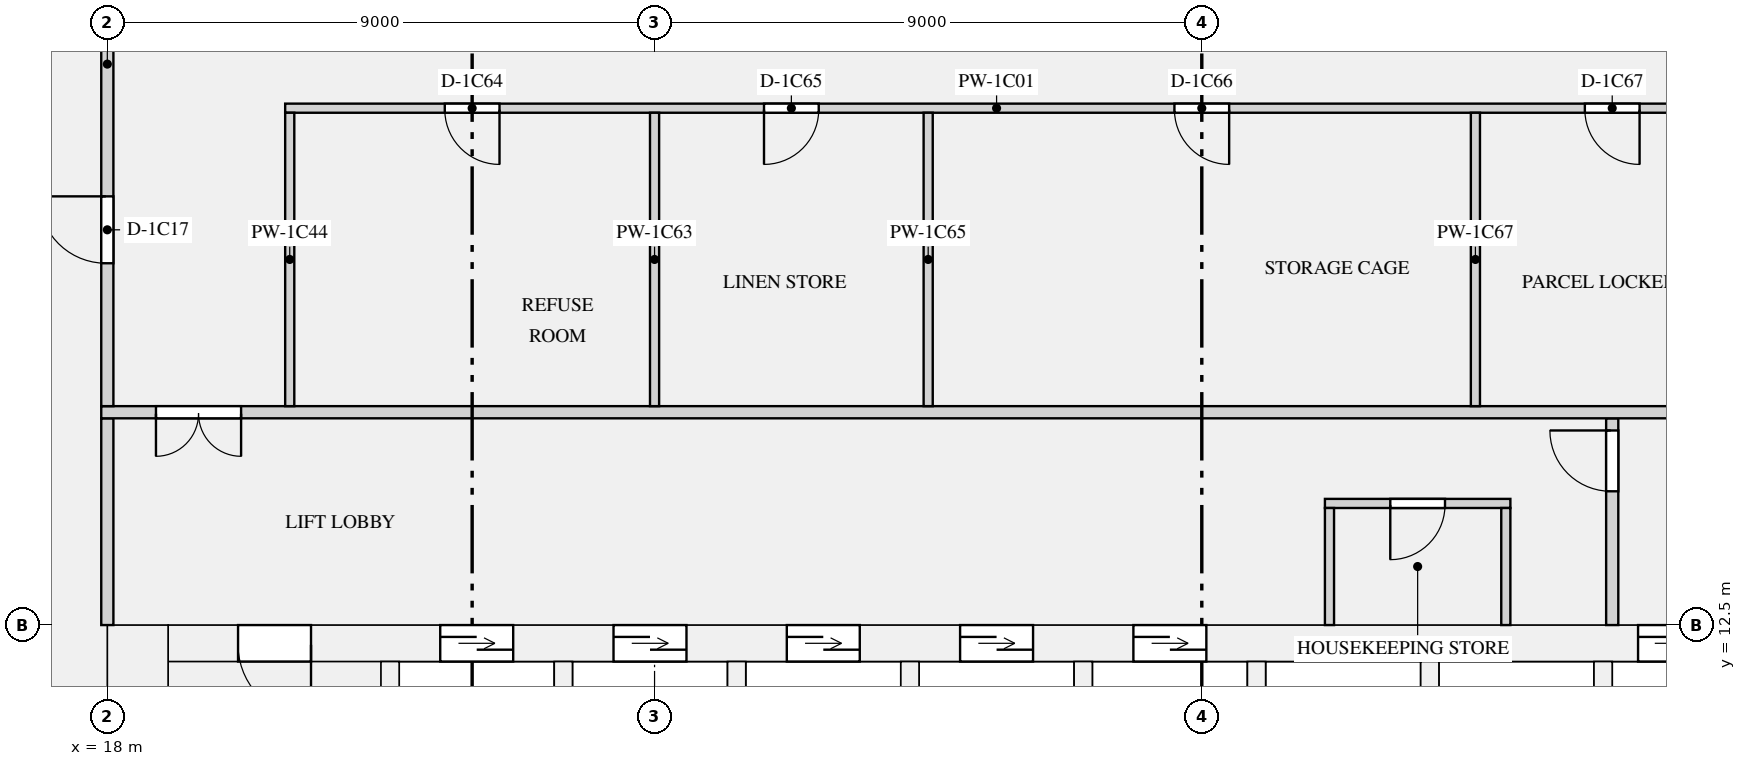
"""IFC4 building model, lengths in metres.
Left out: names, types, materials, properties, quantities, classifications, styles, units other than length and angle.
Written with IfcOpenShell. Run it as: python <this file> out.ifc"""

import sys

from ifc_helpers import new_model, si_unit, direction, frame, frame_2d, origin, place, context, subcontext, project, spatial, rectangle, extrude, element, fill, save


model = new_model("IFC4")
c1 = context("Model", 3, precision=1e-05, world=origin(), true_north=direction((0.0, 1.0)))
c2 = subcontext(c1, "Body", "Model", "MODEL_VIEW")
j1 = project(units=[si_unit("LENGTHUNIT", "METRE"), si_unit("PLANEANGLEUNIT", "RADIAN")], contexts=[c1])
p1 = place(None, origin())
s1 = spatial("IfcSite", under=j1, at=p1, CompositionType="ELEMENT")
p2 = place(p1, origin())
s2 = spatial("IfcBuilding", under=s1, at=p2, CompositionType="ELEMENT")
p3 = place(p2, frame((0.0, 0.0, 38.4)))
s3 = spatial("IfcBuildingStorey", under=s2, at=p3, CompositionType="ELEMENT", Elevation=38.4)
p4 = place(p3, frame((18.5, 0.0, 0.0), z_axis=(0.0, 0.0, 1.0), x_axis=(0.0, 1.0, 0.0)))
e1 = element("IfcWall", 1, at=p4, inside=s3, PredefinedType="SHEAR", context=c2, shape_type="SweptSolid", body=[
    extrude(rectangle(XDim=12.5, YDim=1.0, at=frame_2d((6.25, 0.0))), origin(), (0.0, 0.0, 1.0), 3.15),
])
p5 = place(p3, frame((19.0, 12.2, 0.0), z_axis=(0.0, 0.0, 1.0), x_axis=(1.0, 0.0, 0.0)))
e2 = element("IfcWall", 2, at=p5, inside=s3, PredefinedType="SHEAR", context=c2, shape_type="SweptSolid", body=[
    extrude(rectangle(XDim=34.0, YDim=0.6, at=frame_2d((17.0, 0.0))), origin(), (0.0, 0.0, 1.0), 3.15),
])
p6 = place(p5, frame((4.475, 0.0, 0.0)))
e3 = element("IfcOpeningElement", 3, at=p6, cuts=e2, PredefinedType="OPENING", context=c2, shape_type="SweptSolid", body=[
    extrude(rectangle(XDim=1.2, YDim=2.1, at=frame_2d((0.6, 1.05))), frame((0.0, 0.31, 0.0), z_axis=(0.0, -1.0, 0.0), x_axis=(1.0, 0.0, 0.0)), (0.0, 0.0, 1.0), 0.62),
])
p7 = place(p5, frame((7.325, 0.0, 0.0)))
e4 = element("IfcOpeningElement", 4, at=p7, cuts=e2, PredefinedType="OPENING", context=c2, shape_type="SweptSolid", body=[
    extrude(rectangle(XDim=1.2, YDim=2.1, at=frame_2d((0.6, 1.05))), frame((0.0, 0.31, 0.0), z_axis=(0.0, -1.0, 0.0), x_axis=(1.0, 0.0, 0.0)), (0.0, 0.0, 1.0), 0.62),
])
p8 = place(p5, frame((10.175, 0.0, 0.0)))
e5 = element("IfcOpeningElement", 5, at=p8, cuts=e2, PredefinedType="OPENING", context=c2, shape_type="SweptSolid", body=[
    extrude(rectangle(XDim=1.2, YDim=2.1, at=frame_2d((0.6, 1.05))), frame((0.0, 0.31, 0.0), z_axis=(0.0, -1.0, 0.0), x_axis=(1.0, 0.0, 0.0)), (0.0, 0.0, 1.0), 0.62),
])
p9 = place(p5, frame((13.025, 0.0, 0.0)))
e6 = element("IfcOpeningElement", 6, at=p9, cuts=e2, PredefinedType="OPENING", context=c2, shape_type="SweptSolid", body=[
    extrude(rectangle(XDim=1.2, YDim=2.1, at=frame_2d((0.6, 1.05))), frame((0.0, 0.31, 0.0), z_axis=(0.0, -1.0, 0.0), x_axis=(1.0, 0.0, 0.0)), (0.0, 0.0, 1.0), 0.62),
])
p10 = place(p5, frame((15.875, 0.0, 0.0)))
e7 = element("IfcOpeningElement", 7, at=p10, cuts=e2, PredefinedType="OPENING", context=c2, shape_type="SweptSolid", body=[
    extrude(rectangle(XDim=1.2, YDim=2.1, at=frame_2d((0.6, 1.05))), frame((0.0, 0.31, 0.0), z_axis=(0.0, -1.0, 0.0), x_axis=(1.0, 0.0, 0.0)), (0.0, 0.0, 1.0), 0.62),
])
p11 = place(p5, frame((24.175, 0.0, 0.0)))
e8 = element("IfcOpeningElement", 8, at=p11, cuts=e2, PredefinedType="OPENING", context=c2, shape_type="SweptSolid", body=[
    extrude(rectangle(XDim=1.1, YDim=2.1, at=frame_2d((0.55, 1.05))), frame((0.0, 0.31, 0.0), z_axis=(0.0, -1.0, 0.0), x_axis=(1.0, 0.0, 0.0)), (0.0, 0.0, 1.0), 0.62),
])
p12 = place(p5, frame((26.425, 0.0, 0.0)))
e9 = element("IfcOpeningElement", 9, at=p12, cuts=e2, PredefinedType="OPENING", context=c2, shape_type="SweptSolid", body=[
    extrude(rectangle(XDim=1.1, YDim=2.1, at=frame_2d((0.55, 1.05))), frame((0.0, 0.31, 0.0), z_axis=(0.0, -1.0, 0.0), x_axis=(1.0, 0.0, 0.0)), (0.0, 0.0, 1.0), 0.62),
])
p13 = place(p5, frame((28.675, 0.0, 0.0)))
e10 = element("IfcOpeningElement", 10, at=p13, cuts=e2, PredefinedType="OPENING", context=c2, shape_type="SweptSolid", body=[
    extrude(rectangle(XDim=1.1, YDim=2.1, at=frame_2d((0.55, 1.05))), frame((0.0, 0.31, 0.0), z_axis=(0.0, -1.0, 0.0), x_axis=(1.0, 0.0, 0.0)), (0.0, 0.0, 1.0), 0.62),
])
p14 = place(p5, frame((1.15, 0.0, 0.0)))
e11 = element("IfcOpeningElement", 11, at=p14, cuts=e2, PredefinedType="OPENING", context=c2, shape_type="SweptSolid", body=[
    extrude(rectangle(XDim=1.2, YDim=2.1, at=frame_2d((0.6, 1.05))), frame((0.0, 0.31, 0.0), z_axis=(0.0, -1.0, 0.0), x_axis=(1.0, 0.0, 0.0)), (0.0, 0.0, 1.0), 0.62),
])
p15 = place(p5, frame((31.65, 0.0, 0.0)))
e12 = element("IfcOpeningElement", 12, at=p15, cuts=e2, PredefinedType="OPENING", context=c2, shape_type="SweptSolid", body=[
    extrude(rectangle(XDim=1.2, YDim=2.1, at=frame_2d((0.6, 1.05))), frame((0.0, 0.31, 0.0), z_axis=(0.0, -1.0, 0.0), x_axis=(1.0, 0.0, 0.0)), (0.0, 0.0, 1.0), 0.62),
])
for number, where, z_axis, x_axis in (
    (13, (22.65, 9.35, 0.0), (0.0, 0.0, 1.0), (0.0, 1.0, 0.0)),
    (14, (25.5, 9.35, 0.0), (0.0, 0.0, 1.0), (0.0, 1.0, 0.0)),
    (15, (28.35, 9.35, 0.0), (0.0, 0.0, 1.0), (0.0, 1.0, 0.0)),
    (16, (31.2, 9.35, 0.0), (0.0, 0.0, 1.0), (0.0, 1.0, 0.0)),
    (17, (34.05, 9.35, 0.0), (0.0, 0.0, 1.0), (0.0, 1.0, 0.0)),
    (18, (36.9, 9.35, 0.0), (0.0, 0.0, 1.0), (0.0, 1.0, 0.0)),
    (19, (39.75, 9.35, 0.0), (0.0, 0.0, 1.0), (0.0, 1.0, 0.0)),
):
    element("IfcWall", number, at=place(p3, frame(where, z_axis=z_axis, x_axis=x_axis)), inside=s3, PredefinedType="SHEAR", context=c2, shape_type="SweptSolid", body=[
        extrude(rectangle(XDim=2.55, YDim=0.3, at=frame_2d((1.275, 0.0))), origin(), (0.0, 0.0, 1.0), 3.15),
    ])
p16 = place(p3, frame((42.6, 8.25, 0.0), z_axis=(0.0, 0.0, 1.0), x_axis=(0.0, 1.0, 0.0)))
e20 = element("IfcWall", 20, at=p16, inside=s3, PredefinedType="SHEAR", context=c2, shape_type="SweptSolid", body=[
    extrude(rectangle(XDim=3.65, YDim=0.3, at=frame_2d((1.825, 0.0))), origin(), (0.0, 0.0, 1.0), 3.15),
])
p17 = place(p3, frame((38.025, 14.5, 0.0), z_axis=(0.0, 0.0, 1.0), x_axis=(1.0, 0.0, 0.0)))
e21 = element("IfcWall", 21, at=p17, inside=s3, PredefinedType="PARTITIONING", context=c2, shape_type="SweptSolid", body=[
    extrude(rectangle(XDim=3.05, YDim=0.15, at=frame_2d((1.525, 0.0))), origin(), (0.0, 0.0, 1.0), 2.83),
])
p18 = place(p17, frame((1.075, 0.0, 0.0)))
e22 = element("IfcOpeningElement", 22, at=p18, cuts=e21, PredefinedType="OPENING", context=c2, shape_type="SweptSolid", body=[
    extrude(rectangle(XDim=0.9, YDim=2.1, at=frame_2d((0.45, 1.05))), frame((0.0, 0.085, 0.0), z_axis=(0.0, -1.0, 0.0), x_axis=(1.0, 0.0, 0.0)), (0.0, 0.0, 1.0), 0.17),
])
p19 = place(p3, frame((18.0, 12.5, 0.0), z_axis=(0.0, 0.0, 1.0), x_axis=(0.0, 1.0, 0.0)))
e23 = element("IfcWall", 23, at=p19, inside=s3, PredefinedType="PARTITIONING", context=c2, shape_type="SweptSolid", body=[
    extrude(rectangle(XDim=3.4, YDim=0.2, at=frame_2d((1.7, 0.0))), origin(), (0.0, 0.0, 1.0), 2.83),
])
for number, where, z_axis, x_axis in (
    (24, (38.1, 12.5, 0.0), (0.0, 0.0, 1.0), (0.0, 1.0, 0.0)),
    (25, (41.0, 12.5, 0.0), (0.0, 0.0, 1.0), (0.0, 1.0, 0.0)),
):
    element("IfcWall", number, at=place(p3, frame(where, z_axis=z_axis, x_axis=x_axis)), inside=s3, PredefinedType="PARTITIONING", context=c2, shape_type="SweptSolid", body=[
        extrude(rectangle(XDim=1.925, YDim=0.15, at=frame_2d((0.962, 0.0))), origin(), (0.0, 0.0, 1.0), 2.83),
    ])
p20 = place(p3, frame((42.75, 12.5, 0.0), z_axis=(0.0, 0.0, 1.0), x_axis=(0.0, 1.0, 0.0)))
e26 = element("IfcWall", 26, at=p20, inside=s3, PredefinedType="PARTITIONING", context=c2, shape_type="SweptSolid", body=[
    extrude(rectangle(XDim=3.4, YDim=0.2, at=frame_2d((1.7, 0.0))), origin(), (0.0, 0.0, 1.0), 2.83),
])
p21 = place(p20, frame((2.2, 0.0, 0.0)))
e27 = element("IfcOpeningElement", 27, at=p21, cuts=e26, PredefinedType="OPENING", context=c2, shape_type="SweptSolid", body=[
    extrude(rectangle(XDim=1.0, YDim=2.1, at=frame_2d((0.5, 1.05))), frame((0.0, 0.11, 0.0), z_axis=(0.0, -1.0, 0.0), x_axis=(1.0, 0.0, 0.0)), (0.0, 0.0, 1.0), 0.22),
])
p22 = place(p3, frame((20.925, 21.0, 0.0), z_axis=(0.0, 0.0, 1.0), x_axis=(1.0, 0.0, 0.0)))
e28 = element("IfcWall", 28, at=p22, inside=s3, PredefinedType="PARTITIONING", context=c2, shape_type="SweptSolid", body=[
    extrude(rectangle(XDim=30.15, YDim=0.15, at=frame_2d((15.075, 0.0))), origin(), (0.0, 0.0, 1.0), 2.83),
])
p23 = place(p22, frame((2.625, 0.0, 0.0)))
e29 = element("IfcOpeningElement", 29, at=p23, cuts=e28, PredefinedType="OPENING", context=c2, shape_type="SweptSolid", body=[
    extrude(rectangle(XDim=0.9, YDim=2.1, at=frame_2d((0.45, 1.05))), frame((0.0, 0.085, 0.0), z_axis=(0.0, -1.0, 0.0), x_axis=(1.0, 0.0, 0.0)), (0.0, 0.0, 1.0), 0.17),
])
p24 = place(p22, frame((7.875, 0.0, 0.0)))
e30 = element("IfcOpeningElement", 30, at=p24, cuts=e28, PredefinedType="OPENING", context=c2, shape_type="SweptSolid", body=[
    extrude(rectangle(XDim=0.9, YDim=2.1, at=frame_2d((0.45, 1.05))), frame((0.0, 0.085, 0.0), z_axis=(0.0, -1.0, 0.0), x_axis=(1.0, 0.0, 0.0)), (0.0, 0.0, 1.0), 0.17),
])
p25 = place(p22, frame((14.625, 0.0, 0.0)))
e31 = element("IfcOpeningElement", 31, at=p25, cuts=e28, PredefinedType="OPENING", context=c2, shape_type="SweptSolid", body=[
    extrude(rectangle(XDim=0.9, YDim=2.1, at=frame_2d((0.45, 1.05))), frame((0.0, 0.085, 0.0), z_axis=(0.0, -1.0, 0.0), x_axis=(1.0, 0.0, 0.0)), (0.0, 0.0, 1.0), 0.17),
])
p26 = place(p22, frame((21.375, 0.0, 0.0)))
e32 = element("IfcOpeningElement", 32, at=p26, cuts=e28, PredefinedType="OPENING", context=c2, shape_type="SweptSolid", body=[
    extrude(rectangle(XDim=0.9, YDim=2.1, at=frame_2d((0.45, 1.05))), frame((0.0, 0.085, 0.0), z_axis=(0.0, -1.0, 0.0), x_axis=(1.0, 0.0, 0.0)), (0.0, 0.0, 1.0), 0.17),
])
p27 = place(p22, frame((26.625, 0.0, 0.0)))
e33 = element("IfcOpeningElement", 33, at=p27, cuts=e28, PredefinedType="OPENING", context=c2, shape_type="SweptSolid", body=[
    extrude(rectangle(XDim=0.9, YDim=2.1, at=frame_2d((0.45, 1.05))), frame((0.0, 0.085, 0.0), z_axis=(0.0, -1.0, 0.0), x_axis=(1.0, 0.0, 0.0)), (0.0, 0.0, 1.0), 0.17),
])
p28 = place(p3, frame((17.9, 16.0, 0.0), z_axis=(0.0, 0.0, 1.0), x_axis=(1.0, 0.0, 0.0)))
e34 = element("IfcWall", 34, at=p28, inside=s3, PredefinedType="PARTITIONING", context=c2, shape_type="SweptSolid", body=[
    extrude(rectangle(XDim=36.2, YDim=0.2, at=frame_2d((18.1, 0.0))), origin(), (0.0, 0.0, 1.0), 2.83),
])
p29 = place(p28, frame((0.9, 0.0, 0.0)))
e35 = element("IfcOpeningElement", 35, at=p29, cuts=e34, PredefinedType="OPENING", context=c2, shape_type="SweptSolid", body=[
    extrude(rectangle(XDim=1.4, YDim=2.1, at=frame_2d((0.7, 1.05))), frame((0.0, 0.11, 0.0), z_axis=(0.0, -1.0, 0.0), x_axis=(1.0, 0.0, 0.0)), (0.0, 0.0, 1.0), 0.22),
])
p30 = place(p28, frame((33.9, 0.0, 0.0)))
e36 = element("IfcOpeningElement", 36, at=p30, cuts=e34, PredefinedType="OPENING", context=c2, shape_type="SweptSolid", body=[
    extrude(rectangle(XDim=1.4, YDim=2.1, at=frame_2d((0.7, 1.05))), frame((0.0, 0.11, 0.0), z_axis=(0.0, -1.0, 0.0), x_axis=(1.0, 0.0, 0.0)), (0.0, 0.0, 1.0), 0.22),
])
p31 = place(p3, frame((18.0, 16.1, 0.0), z_axis=(0.0, 0.0, 1.0), x_axis=(0.0, 1.0, 0.0)))
e37 = element("IfcWall", 37, at=p31, inside=s3, PredefinedType="PARTITIONING", context=c2, shape_type="SweptSolid", body=[
    extrude(rectangle(XDim=7.8, YDim=0.2, at=frame_2d((3.9, 0.0))), origin(), (0.0, 0.0, 1.0), 2.83),
])
p32 = place(p31, frame((2.35, 0.0, 0.0)))
e38 = element("IfcOpeningElement", 38, at=p32, cuts=e37, PredefinedType="OPENING", context=c2, shape_type="SweptSolid", body=[
    extrude(rectangle(XDim=1.1, YDim=2.1, at=frame_2d((0.55, 1.05))), frame((0.0, 0.11, 0.0), z_axis=(0.0, -1.0, 0.0), x_axis=(1.0, 0.0, 0.0)), (0.0, 0.0, 1.0), 0.22),
])
for number, where, z_axis, x_axis in (
    (39, (21.0, 16.1, 0.0), (0.0, 0.0, 1.0), (0.0, 1.0, 0.0)),
    (40, (27.0, 16.1, 0.0), (0.0, 0.0, 1.0), (0.0, 1.0, 0.0)),
    (41, (31.5, 16.1, 0.0), (0.0, 0.0, 1.0), (0.0, 1.0, 0.0)),
    (42, (40.5, 16.1, 0.0), (0.0, 0.0, 1.0), (0.0, 1.0, 0.0)),
):
    element("IfcWall", number, at=place(p3, frame(where, z_axis=z_axis, x_axis=x_axis)), inside=s3, PredefinedType="PARTITIONING", context=c2, shape_type="SweptSolid", body=[
        extrude(rectangle(XDim=4.825, YDim=0.15, at=frame_2d((2.413, 0.0))), origin(), (0.0, 0.0, 1.0), 2.83),
    ])
p33 = place(p6, origin())
e43 = element("IfcDoor", 43, at=p33, inside=s3, OperationType="DOUBLE_DOOR_SLIDING", PredefinedType="DOOR", context=c2, shape_type="SweptSolid", body=[
    extrude(rectangle(XDim=1.2, YDim=2.1, at=frame_2d((0.6, 1.05))), frame((0.0, 0.025, 0.0), z_axis=(0.0, -1.0, 0.0), x_axis=(1.0, 0.0, 0.0)), (0.0, 0.0, 1.0), 0.05),
])
fill(e3, e43)
p34 = place(p7, origin())
e44 = element("IfcDoor", 44, at=p34, inside=s3, OperationType="DOUBLE_DOOR_SLIDING", PredefinedType="DOOR", context=c2, shape_type="SweptSolid", body=[
    extrude(rectangle(XDim=1.2, YDim=2.1, at=frame_2d((0.6, 1.05))), frame((0.0, 0.025, 0.0), z_axis=(0.0, -1.0, 0.0), x_axis=(1.0, 0.0, 0.0)), (0.0, 0.0, 1.0), 0.05),
])
fill(e4, e44)
p35 = place(p8, origin())
e45 = element("IfcDoor", 45, at=p35, inside=s3, OperationType="DOUBLE_DOOR_SLIDING", PredefinedType="DOOR", context=c2, shape_type="SweptSolid", body=[
    extrude(rectangle(XDim=1.2, YDim=2.1, at=frame_2d((0.6, 1.05))), frame((0.0, 0.025, 0.0), z_axis=(0.0, -1.0, 0.0), x_axis=(1.0, 0.0, 0.0)), (0.0, 0.0, 1.0), 0.05),
])
fill(e5, e45)
p36 = place(p9, origin())
e46 = element("IfcDoor", 46, at=p36, inside=s3, OperationType="DOUBLE_DOOR_SLIDING", PredefinedType="DOOR", context=c2, shape_type="SweptSolid", body=[
    extrude(rectangle(XDim=1.2, YDim=2.1, at=frame_2d((0.6, 1.05))), frame((0.0, 0.025, 0.0), z_axis=(0.0, -1.0, 0.0), x_axis=(1.0, 0.0, 0.0)), (0.0, 0.0, 1.0), 0.05),
])
fill(e6, e46)
p37 = place(p10, origin())
e47 = element("IfcDoor", 47, at=p37, inside=s3, OperationType="DOUBLE_DOOR_SLIDING", PredefinedType="DOOR", context=c2, shape_type="SweptSolid", body=[
    extrude(rectangle(XDim=1.2, YDim=2.1, at=frame_2d((0.6, 1.05))), frame((0.0, 0.025, 0.0), z_axis=(0.0, -1.0, 0.0), x_axis=(1.0, 0.0, 0.0)), (0.0, 0.0, 1.0), 0.05),
])
fill(e7, e47)
p38 = place(p11, origin())
e48 = element("IfcDoor", 48, at=p38, inside=s3, OperationType="DOUBLE_DOOR_SLIDING", PredefinedType="DOOR", context=c2, shape_type="SweptSolid", body=[
    extrude(rectangle(XDim=1.1, YDim=2.1, at=frame_2d((0.55, 1.05))), frame((0.0, 0.025, 0.0), z_axis=(0.0, -1.0, 0.0), x_axis=(1.0, 0.0, 0.0)), (0.0, 0.0, 1.0), 0.05),
])
fill(e8, e48)
p39 = place(p18, frame((0.9, 0.0, 0.0), z_axis=(0.0, 0.0, 1.0), x_axis=(-1.0, 0.0, 0.0)))
e49 = element("IfcDoor", 49, at=p39, inside=s3, OperationType="SINGLE_SWING_RIGHT", PredefinedType="DOOR", context=c2, shape_type="SweptSolid", body=[
    extrude(rectangle(XDim=0.9, YDim=2.1, at=frame_2d((0.45, 1.05))), frame((0.0, 0.025, 0.0), z_axis=(0.0, -1.0, 0.0), x_axis=(1.0, 0.0, 0.0)), (0.0, 0.0, 1.0), 0.05),
])
fill(e22, e49)
p40 = place(p14, frame((1.2, 0.0, 0.0), z_axis=(0.0, 0.0, 1.0), x_axis=(-1.0, 0.0, 0.0)))
e50 = element("IfcDoor", 50, at=p40, inside=s3, OperationType="SINGLE_SWING_LEFT", PredefinedType="DOOR", context=c2, shape_type="SweptSolid", body=[
    extrude(rectangle(XDim=1.2, YDim=2.1, at=frame_2d((0.6, 1.05))), frame((0.0, 0.025, 0.0), z_axis=(0.0, -1.0, 0.0), x_axis=(1.0, 0.0, 0.0)), (0.0, 0.0, 1.0), 0.05),
])
fill(e11, e50)
p41 = place(p21, origin())
e51 = element("IfcDoor", 51, at=p41, inside=s3, OperationType="SINGLE_SWING_RIGHT", PredefinedType="DOOR", context=c2, shape_type="SweptSolid", body=[
    extrude(rectangle(XDim=1.0, YDim=2.1, at=frame_2d((0.5, 1.05))), frame((0.0, 0.025, 0.0), z_axis=(0.0, -1.0, 0.0), x_axis=(1.0, 0.0, 0.0)), (0.0, 0.0, 1.0), 0.05),
])
fill(e27, e51)
p42 = place(p29, frame((1.4, 0.0, 0.0), z_axis=(0.0, 0.0, 1.0), x_axis=(-1.0, 0.0, 0.0)))
e52 = element("IfcDoor", 52, at=p42, inside=s3, OperationType="DOUBLE_DOOR_SINGLE_SWING", PredefinedType="DOOR", context=c2, shape_type="SweptSolid", body=[
    extrude(rectangle(XDim=1.4, YDim=2.1, at=frame_2d((0.7, 1.05))), frame((0.0, 0.025, 0.0), z_axis=(0.0, -1.0, 0.0), x_axis=(1.0, 0.0, 0.0)), (0.0, 0.0, 1.0), 0.05),
])
fill(e35, e52)
p43 = place(p32, origin())
e53 = element("IfcDoor", 53, at=p43, inside=s3, OperationType="SINGLE_SWING_RIGHT", PredefinedType="DOOR", context=c2, shape_type="SweptSolid", body=[
    extrude(rectangle(XDim=1.1, YDim=2.1, at=frame_2d((0.55, 1.05))), frame((0.0, 0.025, 0.0), z_axis=(0.0, -1.0, 0.0), x_axis=(1.0, 0.0, 0.0)), (0.0, 0.0, 1.0), 0.05),
])
fill(e38, e53)
p44 = place(p23, frame((0.9, 0.0, 0.0), z_axis=(0.0, 0.0, 1.0), x_axis=(-1.0, 0.0, 0.0)))
e54 = element("IfcDoor", 54, at=p44, inside=s3, OperationType="SINGLE_SWING_LEFT", PredefinedType="DOOR", context=c2, shape_type="SweptSolid", body=[
    extrude(rectangle(XDim=0.9, YDim=2.1, at=frame_2d((0.45, 1.05))), frame((0.0, 0.025, 0.0), z_axis=(0.0, -1.0, 0.0), x_axis=(1.0, 0.0, 0.0)), (0.0, 0.0, 1.0), 0.05),
])
fill(e29, e54)
p45 = place(p24, frame((0.9, 0.0, 0.0), z_axis=(0.0, 0.0, 1.0), x_axis=(-1.0, 0.0, 0.0)))
e55 = element("IfcDoor", 55, at=p45, inside=s3, OperationType="SINGLE_SWING_RIGHT", PredefinedType="DOOR", context=c2, shape_type="SweptSolid", body=[
    extrude(rectangle(XDim=0.9, YDim=2.1, at=frame_2d((0.45, 1.05))), frame((0.0, 0.025, 0.0), z_axis=(0.0, -1.0, 0.0), x_axis=(1.0, 0.0, 0.0)), (0.0, 0.0, 1.0), 0.05),
])
fill(e30, e55)
p46 = place(p25, frame((0.9, 0.0, 0.0), z_axis=(0.0, 0.0, 1.0), x_axis=(-1.0, 0.0, 0.0)))
e56 = element("IfcDoor", 56, at=p46, inside=s3, OperationType="SINGLE_SWING_LEFT", PredefinedType="DOOR", context=c2, shape_type="SweptSolid", body=[
    extrude(rectangle(XDim=0.9, YDim=2.1, at=frame_2d((0.45, 1.05))), frame((0.0, 0.025, 0.0), z_axis=(0.0, -1.0, 0.0), x_axis=(1.0, 0.0, 0.0)), (0.0, 0.0, 1.0), 0.05),
])
fill(e31, e56)
p47 = place(p26, frame((0.9, 0.0, 0.0), z_axis=(0.0, 0.0, 1.0), x_axis=(-1.0, 0.0, 0.0)))
e57 = element("IfcDoor", 57, at=p47, inside=s3, OperationType="SINGLE_SWING_LEFT", PredefinedType="DOOR", context=c2, shape_type="SweptSolid", body=[
    extrude(rectangle(XDim=0.9, YDim=2.1, at=frame_2d((0.45, 1.05))), frame((0.0, 0.025, 0.0), z_axis=(0.0, -1.0, 0.0), x_axis=(1.0, 0.0, 0.0)), (0.0, 0.0, 1.0), 0.05),
])
fill(e32, e57)
save(model, sys.argv[1])
